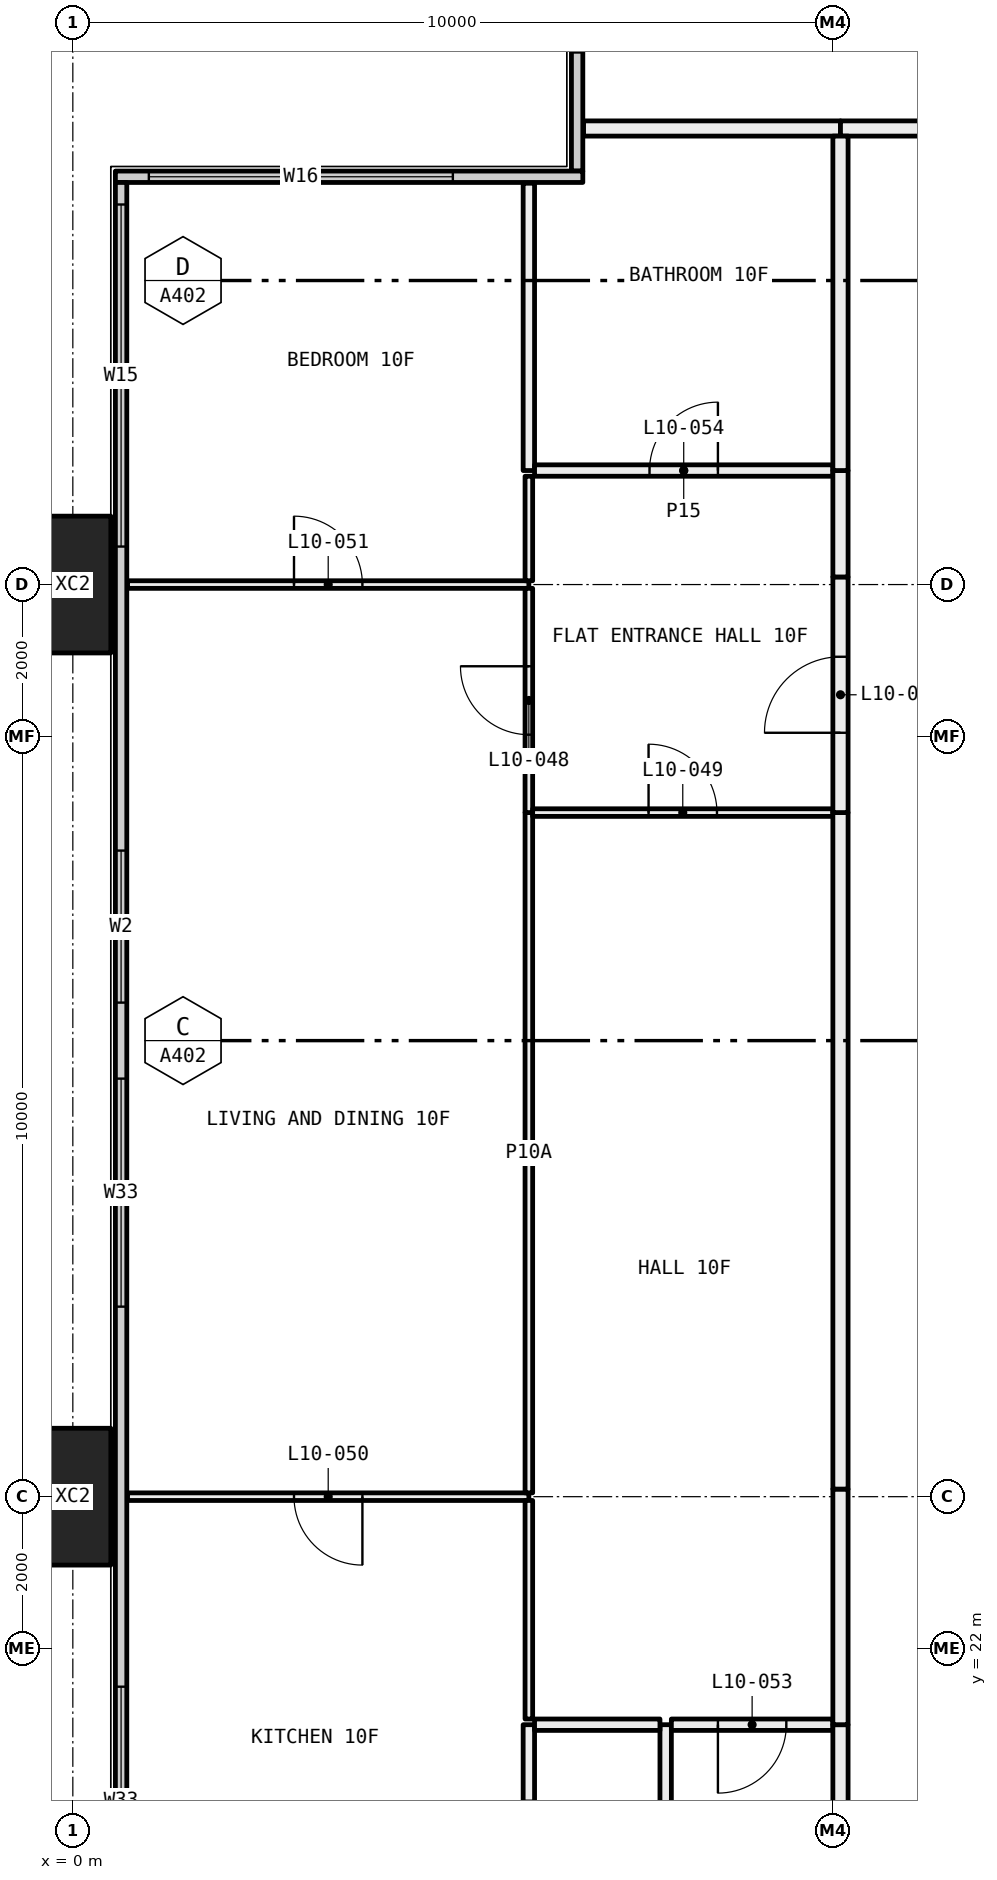
"""IFC4 building model, lengths in metres.
Left out: names, types, materials, properties, quantities, classifications, styles, units other than length and angle.
Written with IfcOpenShell. Run it as: python <this file> out.ifc"""

import sys

from ifc_helpers import new_model, si_unit, direction, frame, frame_2d, origin, origin_2d, place, context, subcontext, project, spatial, rectangle, hollow_rectangle, extrude, element, fill, save


model = new_model("IFC4")
c1 = context("Model", 3, precision=1e-05, world=origin(), true_north=direction((0.0, 1.0)))
c2 = subcontext(c1, "Body", "Model", "MODEL_VIEW")
j1 = project(units=[si_unit("LENGTHUNIT", "METRE"), si_unit("PLANEANGLEUNIT", "RADIAN")], contexts=[c1])
p1 = place(None, origin())
s1 = spatial("IfcSite", under=j1, at=p1, CompositionType="ELEMENT")
p2 = place(p1, origin())
s2 = spatial("IfcBuilding", under=s1, at=p2, CompositionType="ELEMENT")
p3 = place(p2, frame((0.0, 0.0, 47.25)))
s3 = spatial("IfcBuildingStorey", under=s2, at=p3, CompositionType="ELEMENT", Elevation=47.25)
for number, where, z_axis, x_axis in (
    (1, (0.0, 24.0, -0.4), (0.0, 0.0, 1.0), (0.0, 1.0, 0.0)),
    (2, (0.0, 36.0, -0.4), (0.0, 0.0, 1.0), (0.0, 1.0, 0.0)),
):
    element("IfcColumn", number, at=place(p3, frame(where, z_axis=z_axis, x_axis=x_axis)), inside=s3, PredefinedType="COLUMN", context=c2, shape_type="SweptSolid", body=[
        extrude(hollow_rectangle(XDim=1.8, YDim=1.0, WallThickness=0.07, at=origin_2d()), origin(), (0.0, 0.0, 1.0), 3.45),
    ])
p4 = place(p3, frame((6.635, 41.44, 0.0), z_axis=(0.0, 0.0, 1.0), x_axis=(0.0, 1.0, 0.0)))
e3 = element("IfcWall", 3, at=p4, inside=s3, PredefinedType="ELEMENTEDWALL", context=c2, shape_type="SweptSolid", body=[
    extrude(rectangle(XDim=5.85, YDim=0.15, at=frame_2d((2.925, 0.0))), origin(), (0.0, 0.0, 1.0), 3.05),
])
p5 = place(p4, frame((1.56, 0.0, 0.45)))
e4 = element("IfcOpeningElement", 4, at=p5, cuts=e3, PredefinedType="OPENING", context=c2, shape_type="SweptSolid", body=[
    extrude(rectangle(XDim=4.0, YDim=2.55, at=frame_2d((2.0, 1.275))), frame((0.0, 0.085, 0.0), z_axis=(0.0, -1.0, 0.0), x_axis=(1.0, 0.0, 0.0)), (0.0, 0.0, 1.0), 0.17),
])
p6 = place(p3, frame((0.56, 41.365, 0.0), z_axis=(0.0, 0.0, 1.0), x_axis=(1.0, 0.0, 0.0)))
e5 = element("IfcWall", 5, at=p6, inside=s3, PredefinedType="ELEMENTEDWALL", context=c2, shape_type="SweptSolid", body=[
    extrude(rectangle(XDim=6.15, YDim=0.15, at=frame_2d((3.075, 0.0))), origin(), (0.0, 0.0, 1.0), 3.05),
])
p7 = place(p6, frame((0.44, 0.0, 0.45)))
e6 = element("IfcOpeningElement", 6, at=p7, cuts=e5, PredefinedType="OPENING", context=c2, shape_type="SweptSolid", body=[
    extrude(rectangle(XDim=4.0, YDim=2.55, at=frame_2d((2.0, 1.275))), frame((0.0, 0.085, 0.0), z_axis=(0.0, -1.0, 0.0), x_axis=(1.0, 0.0, 0.0)), (0.0, 0.0, 1.0), 0.17),
])
p8 = place(p3, frame((0.635, 6.71, 0.0), z_axis=(0.0, 0.0, 1.0), x_axis=(0.0, 1.0, 0.0)))
e7 = element("IfcWall", 7, at=p8, inside=s3, PredefinedType="ELEMENTEDWALL", context=c2, shape_type="SweptSolid", body=[
    extrude(rectangle(XDim=34.58, YDim=0.15, at=frame_2d((17.29, 0.0))), origin(), (0.0, 0.0, 1.0), 3.05),
])
p9 = place(p8, frame((0.29, 0.0, 0.45)))
e8 = element("IfcOpeningElement", 8, at=p9, cuts=e7, PredefinedType="OPENING", context=c2, shape_type="SweptSolid", body=[
    extrude(rectangle(XDim=4.5, YDim=2.55, at=frame_2d((2.25, 1.275))), frame((0.0, 0.085, 0.0), z_axis=(0.0, -1.0, 0.0), x_axis=(1.0, 0.0, 0.0)), (0.0, 0.0, 1.0), 0.17),
])
p10 = place(p8, frame((7.79, 0.0, 0.45)))
e9 = element("IfcOpeningElement", 9, at=p10, cuts=e7, PredefinedType="OPENING", context=c2, shape_type="SweptSolid", body=[
    extrude(rectangle(XDim=3.0, YDim=2.55, at=frame_2d((1.5, 1.275))), frame((0.0, 0.085, 0.0), z_axis=(0.0, -1.0, 0.0), x_axis=(1.0, 0.0, 0.0)), (0.0, 0.0, 1.0), 0.17),
])
p11 = place(p8, frame((11.79, 0.0, 0.45)))
e10 = element("IfcOpeningElement", 10, at=p11, cuts=e7, PredefinedType="OPENING", context=c2, shape_type="SweptSolid", body=[
    extrude(rectangle(XDim=3.0, YDim=2.55, at=frame_2d((1.5, 1.275))), frame((0.0, 0.085, 0.0), z_axis=(0.0, -1.0, 0.0), x_axis=(1.0, 0.0, 0.0)), (0.0, 0.0, 1.0), 0.17),
])
p12 = place(p8, frame((19.79, 0.0, 0.45)))
e11 = element("IfcOpeningElement", 11, at=p12, cuts=e7, PredefinedType="OPENING", context=c2, shape_type="SweptSolid", body=[
    extrude(rectangle(XDim=3.0, YDim=2.55, at=frame_2d((1.5, 1.275))), frame((0.0, 0.085, 0.0), z_axis=(0.0, -1.0, 0.0), x_axis=(1.0, 0.0, 0.0)), (0.0, 0.0, 1.0), 0.17),
])
p13 = place(p8, frame((23.79, 0.0, 0.45)))
e12 = element("IfcOpeningElement", 12, at=p13, cuts=e7, PredefinedType="OPENING", context=c2, shape_type="SweptSolid", body=[
    extrude(rectangle(XDim=2.0, YDim=2.55, at=frame_2d((1.0, 1.275))), frame((0.0, 0.085, 0.0), z_axis=(0.0, -1.0, 0.0), x_axis=(1.0, 0.0, 0.0)), (0.0, 0.0, 1.0), 0.17),
])
p14 = place(p8, frame((29.79, 0.0, 0.45)))
e13 = element("IfcOpeningElement", 13, at=p14, cuts=e7, PredefinedType="OPENING", context=c2, shape_type="SweptSolid", body=[
    extrude(rectangle(XDim=4.5, YDim=2.55, at=frame_2d((2.25, 1.275))), frame((0.0, 0.085, 0.0), z_axis=(0.0, -1.0, 0.0), x_axis=(1.0, 0.0, 0.0)), (0.0, 0.0, 1.0), 0.17),
])
p15 = place(p3, frame((6.72, 42.0, 0.0), z_axis=(0.0, 0.0, 1.0), x_axis=(1.0, 0.0, 0.0)))
e14 = element("IfcWall", 14, at=p15, inside=s3, PredefinedType="PARTITIONING", context=c2, shape_type="SweptSolid", body=[
    extrude(rectangle(XDim=3.38, YDim=0.2, at=frame_2d((1.69, 0.0))), origin(), (0.0, 0.0, 1.0), 3.05),
])
p16 = place(p3, frame((10.1, 42.0, 0.0), z_axis=(0.0, 0.0, 1.0), x_axis=(1.0, 0.0, 0.0)))
e15 = element("IfcWall", 15, at=p16, inside=s3, PredefinedType="PARTITIONING", context=c2, shape_type="SweptSolid", body=[
    extrude(rectangle(XDim=1.9, YDim=0.2, at=frame_2d((0.95, 0.0))), origin(), (0.0, 0.0, 1.0), 3.05),
])
p17 = place(p3, frame((6.0, 24.0, 0.0), z_axis=(0.0, 0.0, 1.0), x_axis=(-1.0, 0.0, 0.0)))
e16 = element("IfcWall", 16, at=p17, inside=s3, PredefinedType="PARTITIONING", context=c2, shape_type="SweptSolid", body=[
    extrude(rectangle(XDim=5.28, YDim=0.1, at=frame_2d((2.64, 0.0))), origin(), (0.0, 0.0, 1.0), 2.45),
])
p18 = place(p17, frame((2.19, 0.0, 0.0)))
e17 = element("IfcOpeningElement", 17, at=p18, cuts=e16, PredefinedType="OPENING", context=c2, shape_type="SweptSolid", body=[
    extrude(rectangle(XDim=0.9, YDim=2.1, at=frame_2d((0.45, 1.05))), frame((0.0, 0.06, 0.0), z_axis=(0.0, -1.0, 0.0), x_axis=(1.0, 0.0, 0.0)), (0.0, 0.0, 1.0), 0.12),
])
p19 = place(p3, frame((6.0, 18.1, 0.0), z_axis=(0.0, 0.0, 1.0), x_axis=(0.0, 1.0, 0.0)))
e18 = element("IfcWall", 18, at=p19, inside=s3, PredefinedType="PARTITIONING", context=c2, shape_type="SweptSolid", body=[
    extrude(rectangle(XDim=2.9, YDim=0.15, at=frame_2d((1.45, 0.0))), origin(), (0.0, 0.0, 1.0), 3.05),
])
p20 = place(p19, frame((1.0, 0.0, 0.0)))
e19 = element("IfcOpeningElement", 19, at=p20, cuts=e18, PredefinedType="OPENING", context=c2, shape_type="SweptSolid", body=[
    extrude(rectangle(XDim=0.9, YDim=2.1, at=frame_2d((0.45, 1.05))), frame((0.0, 0.085, 0.0), z_axis=(0.0, -1.0, 0.0), x_axis=(1.0, 0.0, 0.0)), (0.0, 0.0, 1.0), 0.17),
])
p21 = place(p3, frame((6.0, 21.075, 0.0), z_axis=(0.0, 0.0, 1.0), x_axis=(0.0, 1.0, 0.0)))
e20 = element("IfcWall", 20, at=p21, inside=s3, PredefinedType="PARTITIONING", context=c2, shape_type="SweptSolid", body=[
    extrude(rectangle(XDim=2.875, YDim=0.1, at=frame_2d((1.438, 0.0))), origin(), (0.0, 0.0, 1.0), 2.45),
])
p22 = place(p3, frame((6.0, 36.0, 0.0), z_axis=(0.0, 0.0, 1.0), x_axis=(-1.0, 0.0, 0.0)))
e21 = element("IfcWall", 21, at=p22, inside=s3, PredefinedType="PARTITIONING", context=c2, shape_type="SweptSolid", body=[
    extrude(rectangle(XDim=5.28, YDim=0.1, at=frame_2d((2.64, 0.0))), origin(), (0.0, 0.0, 1.0), 2.45),
])
p23 = place(p22, frame((2.19, 0.0, 0.0)))
e22 = element("IfcOpeningElement", 22, at=p23, cuts=e21, PredefinedType="OPENING", context=c2, shape_type="SweptSolid", body=[
    extrude(rectangle(XDim=0.9, YDim=2.1, at=frame_2d((0.45, 1.05))), frame((0.0, 0.06, 0.0), z_axis=(0.0, -1.0, 0.0), x_axis=(1.0, 0.0, 0.0)), (0.0, 0.0, 1.0), 0.12),
])
p24 = place(p3, frame((6.0, 24.05, 0.0), z_axis=(0.0, 0.0, 1.0), x_axis=(0.0, 1.0, 0.0)))
e23 = element("IfcWall", 23, at=p24, inside=s3, PredefinedType="PARTITIONING", context=c2, shape_type="SweptSolid", body=[
    extrude(rectangle(XDim=8.95, YDim=0.1, at=frame_2d((4.475, 0.0))), origin(), (0.0, 0.0, 1.0), 2.45),
])
p25 = place(p3, frame((6.0, 33.0, 0.0), z_axis=(0.0, 0.0, 1.0), x_axis=(0.0, 1.0, 0.0)))
e24 = element("IfcWall", 24, at=p25, inside=s3, PredefinedType="PARTITIONING", context=c2, shape_type="SweptSolid", body=[
    extrude(rectangle(XDim=2.95, YDim=0.1, at=frame_2d((1.475, 0.0))), origin(), (0.0, 0.0, 1.0), 2.45),
])
p26 = place(p25, frame((1.025, 0.0, 0.0)))
e25 = element("IfcOpeningElement", 25, at=p26, cuts=e24, PredefinedType="OPENING", context=c2, shape_type="SweptSolid", body=[
    extrude(rectangle(XDim=0.9, YDim=2.1, at=frame_2d((0.45, 1.05))), frame((0.0, 0.06, 0.0), z_axis=(0.0, -1.0, 0.0), x_axis=(1.0, 0.0, 0.0)), (0.0, 0.0, 1.0), 0.12),
])
p27 = place(p3, frame((6.0, 36.05, 0.0), z_axis=(0.0, 0.0, 1.0), x_axis=(0.0, 1.0, 0.0)))
e26 = element("IfcWall", 26, at=p27, inside=s3, PredefinedType="PARTITIONING", context=c2, shape_type="SweptSolid", body=[
    extrude(rectangle(XDim=1.375, YDim=0.1, at=frame_2d((0.688, 0.0))), origin(), (0.0, 0.0, 1.0), 2.45),
])
p28 = place(p3, frame((6.0, 37.5, 0.0), z_axis=(0.0, 0.0, 1.0), x_axis=(0.0, 1.0, 0.0)))
e27 = element("IfcWall", 27, at=p28, inside=s3, PredefinedType="PARTITIONING", context=c2, shape_type="SweptSolid", body=[
    extrude(rectangle(XDim=3.78, YDim=0.15, at=frame_2d((1.89, 0.0))), origin(), (0.0, 0.0, 1.0), 3.05),
])
p29 = place(p3, frame((7.8, 18.1, 0.0), z_axis=(0.0, 0.0, 1.0), x_axis=(0.0, 1.0, 0.0)))
e28 = element("IfcWall", 28, at=p29, inside=s3, PredefinedType="PARTITIONING", context=c2, shape_type="SweptSolid", body=[
    extrude(rectangle(XDim=2.9, YDim=0.15, at=frame_2d((1.45, 0.0))), origin(), (0.0, 0.0, 1.0), 3.05),
])
p30 = place(p3, frame((7.725, 21.0, 0.0), z_axis=(0.0, 0.0, 1.0), x_axis=(-1.0, 0.0, 0.0)))
e29 = element("IfcWall", 29, at=p30, inside=s3, PredefinedType="PARTITIONING", context=c2, shape_type="SweptSolid", body=[
    extrude(rectangle(XDim=1.65, YDim=0.15, at=frame_2d((0.825, 0.0))), origin(), (0.0, 0.0, 1.0), 3.05),
])
p31 = place(p3, frame((10.0, 21.0, 0.0), z_axis=(0.0, 0.0, 1.0), x_axis=(-1.0, 0.0, 0.0)))
e30 = element("IfcWall", 30, at=p31, inside=s3, PredefinedType="PARTITIONING", context=c2, shape_type="SweptSolid", body=[
    extrude(rectangle(XDim=2.125, YDim=0.15, at=frame_2d((1.062, 0.0))), origin(), (0.0, 0.0, 1.0), 3.05),
])
p32 = place(p31, frame((0.613, 0.0, 0.0)))
e31 = element("IfcOpeningElement", 31, at=p32, cuts=e30, PredefinedType="OPENING", context=c2, shape_type="SweptSolid", body=[
    extrude(rectangle(XDim=0.9, YDim=2.1, at=frame_2d((0.45, 1.05))), frame((0.0, 0.085, 0.0), z_axis=(0.0, -1.0, 0.0), x_axis=(1.0, 0.0, 0.0)), (0.0, 0.0, 1.0), 0.17),
])
p33 = place(p3, frame((10.1, 18.1, 0.0), z_axis=(0.0, 0.0, 1.0), x_axis=(0.0, 1.0, 0.0)))
e32 = element("IfcWall", 32, at=p33, inside=s3, PredefinedType="PARTITIONING", context=c2, shape_type="SweptSolid", body=[
    extrude(rectangle(XDim=2.9, YDim=0.2, at=frame_2d((1.45, 0.0))), origin(), (0.0, 0.0, 1.0), 3.05),
])
p34 = place(p3, frame((10.0, 33.0, 0.0), z_axis=(0.0, 0.0, 1.0), x_axis=(-1.0, 0.0, 0.0)))
e33 = element("IfcWall", 33, at=p34, inside=s3, PredefinedType="PARTITIONING", context=c2, shape_type="SweptSolid", body=[
    extrude(rectangle(XDim=3.95, YDim=0.1, at=frame_2d((1.975, 0.0))), origin(), (0.0, 0.0, 1.0), 3.05),
])
p35 = place(p34, frame((1.525, 0.0, 0.0)))
e34 = element("IfcOpeningElement", 34, at=p35, cuts=e33, PredefinedType="OPENING", context=c2, shape_type="SweptSolid", body=[
    extrude(rectangle(XDim=0.9, YDim=2.1, at=frame_2d((0.45, 1.05))), frame((0.0, 0.06, 0.0), z_axis=(0.0, -1.0, 0.0), x_axis=(1.0, 0.0, 0.0)), (0.0, 0.0, 1.0), 0.12),
])
p36 = place(p3, frame((10.1, 21.0, 0.0), z_axis=(0.0, 0.0, 1.0), x_axis=(0.0, 1.0, 0.0)))
e35 = element("IfcWall", 35, at=p36, inside=s3, PredefinedType="PARTITIONING", context=c2, shape_type="SweptSolid", body=[
    extrude(rectangle(XDim=3.1, YDim=0.2, at=frame_2d((1.55, 0.0))), origin(), (0.0, 0.0, 1.0), 2.45),
])
p37 = place(p3, frame((10.1, 24.1, 0.0), z_axis=(0.0, 0.0, 1.0), x_axis=(0.0, 1.0, 0.0)))
e36 = element("IfcWall", 36, at=p37, inside=s3, PredefinedType="PARTITIONING", context=c2, shape_type="SweptSolid", body=[
    extrude(rectangle(XDim=8.9, YDim=0.2, at=frame_2d((4.45, 0.0))), origin(), (0.0, 0.0, 1.0), 3.05),
])
p38 = place(p3, frame((10.0, 37.5, 0.0), z_axis=(0.0, 0.0, 1.0), x_axis=(-1.0, 0.0, 0.0)))
e37 = element("IfcWall", 37, at=p38, inside=s3, PredefinedType="PARTITIONING", context=c2, shape_type="SweptSolid", body=[
    extrude(rectangle(XDim=3.925, YDim=0.15, at=frame_2d((1.962, 0.0))), origin(), (0.0, 0.0, 1.0), 3.05),
])
p39 = place(p38, frame((1.512, 0.0, 0.0)))
e38 = element("IfcOpeningElement", 38, at=p39, cuts=e37, PredefinedType="OPENING", context=c2, shape_type="SweptSolid", body=[
    extrude(rectangle(XDim=0.9, YDim=2.1, at=frame_2d((0.45, 1.05))), frame((0.0, 0.085, 0.0), z_axis=(0.0, -1.0, 0.0), x_axis=(1.0, 0.0, 0.0)), (0.0, 0.0, 1.0), 0.17),
])
p40 = place(p3, frame((10.1, 33.0, 0.0), z_axis=(0.0, 0.0, 1.0), x_axis=(0.0, 1.0, 0.0)))
e39 = element("IfcWall", 39, at=p40, inside=s3, PredefinedType="PARTITIONING", context=c2, shape_type="SweptSolid", body=[
    extrude(rectangle(XDim=3.1, YDim=0.2, at=frame_2d((1.55, 0.0))), origin(), (0.0, 0.0, 1.0), 2.45),
])
p41 = place(p40, frame((1.05, 0.0, 0.0)))
e40 = element("IfcOpeningElement", 40, at=p41, cuts=e39, PredefinedType="OPENING", context=c2, shape_type="SweptSolid", body=[
    extrude(rectangle(XDim=1.0, YDim=2.1, at=frame_2d((0.5, 1.05))), frame((0.0, 0.11, 0.0), z_axis=(0.0, -1.0, 0.0), x_axis=(1.0, 0.0, 0.0)), (0.0, 0.0, 1.0), 0.22),
])
p42 = place(p3, frame((10.1, 36.1, 0.0), z_axis=(0.0, 0.0, 1.0), x_axis=(0.0, 1.0, 0.0)))
e41 = element("IfcWall", 41, at=p42, inside=s3, PredefinedType="PARTITIONING", context=c2, shape_type="SweptSolid", body=[
    extrude(rectangle(XDim=1.4, YDim=0.2, at=frame_2d((0.7, 0.0))), origin(), (0.0, 0.0, 1.0), 3.05),
])
p43 = place(p3, frame((10.1, 37.5, 0.0), z_axis=(0.0, 0.0, 1.0), x_axis=(0.0, 1.0, 0.0)))
e42 = element("IfcWall", 42, at=p43, inside=s3, PredefinedType="PARTITIONING", context=c2, shape_type="SweptSolid", body=[
    extrude(rectangle(XDim=4.4, YDim=0.2, at=frame_2d((2.2, 0.0))), origin(), (0.0, 0.0, 1.0), 3.05),
])
p44 = place(p7, origin())
e43 = element("IfcWindow", 43, at=p44, inside=s3, PartitioningType="SINGLE_PANEL", PredefinedType="WINDOW", context=c2, shape_type="SweptSolid", body=[
    extrude(rectangle(XDim=4.0, YDim=2.55, at=frame_2d((2.0, 1.275))), frame((0.0, 0.03, 0.0), z_axis=(0.0, -1.0, 0.0), x_axis=(1.0, 0.0, 0.0)), (0.0, 0.0, 1.0), 0.06),
])
fill(e6, e43)
p45 = place(p11, origin())
e44 = element("IfcWindow", 44, at=p45, inside=s3, PartitioningType="SINGLE_PANEL", PredefinedType="WINDOW", context=c2, shape_type="SweptSolid", body=[
    extrude(rectangle(XDim=3.0, YDim=2.55, at=frame_2d((1.5, 1.275))), frame((0.0, 0.03, 0.0), z_axis=(0.0, -1.0, 0.0), x_axis=(1.0, 0.0, 0.0)), (0.0, 0.0, 1.0), 0.06),
])
fill(e10, e44)
p46 = place(p12, origin())
e45 = element("IfcWindow", 45, at=p46, inside=s3, PartitioningType="SINGLE_PANEL", PredefinedType="WINDOW", context=c2, shape_type="SweptSolid", body=[
    extrude(rectangle(XDim=3.0, YDim=2.55, at=frame_2d((1.5, 1.275))), frame((0.0, 0.03, 0.0), z_axis=(0.0, -1.0, 0.0), x_axis=(1.0, 0.0, 0.0)), (0.0, 0.0, 1.0), 0.06),
])
fill(e11, e45)
p47 = place(p13, origin())
e46 = element("IfcWindow", 46, at=p47, inside=s3, PartitioningType="SINGLE_PANEL", PredefinedType="WINDOW", context=c2, shape_type="SweptSolid", body=[
    extrude(rectangle(XDim=2.0, YDim=2.55, at=frame_2d((1.0, 1.275))), frame((0.0, 0.03, 0.0), z_axis=(0.0, -1.0, 0.0), x_axis=(1.0, 0.0, 0.0)), (0.0, 0.0, 1.0), 0.06),
])
fill(e12, e46)
p48 = place(p14, origin())
e47 = element("IfcWindow", 47, at=p48, inside=s3, PartitioningType="SINGLE_PANEL", PredefinedType="WINDOW", context=c2, shape_type="SweptSolid", body=[
    extrude(rectangle(XDim=4.5, YDim=2.55, at=frame_2d((2.25, 1.275))), frame((0.0, 0.03, 0.0), z_axis=(0.0, -1.0, 0.0), x_axis=(1.0, 0.0, 0.0)), (0.0, 0.0, 1.0), 0.06),
])
fill(e13, e47)
p49 = place(p41, origin())
e48 = element("IfcDoor", 48, at=p49, inside=s3, OperationType="SINGLE_SWING_RIGHT", PredefinedType="DOOR", context=c2, shape_type="SweptSolid", body=[
    extrude(rectangle(XDim=1.0, YDim=2.1, at=frame_2d((0.5, 1.05))), frame((0.0, 0.025, 0.0), z_axis=(0.0, -1.0, 0.0), x_axis=(1.0, 0.0, 0.0)), (0.0, 0.0, 1.0), 0.05),
])
fill(e40, e48)
p50 = place(p26, origin())
e49 = element("IfcDoor", 49, at=p50, inside=s3, OperationType="SINGLE_SWING_LEFT", PredefinedType="DOOR", context=c2, shape_type="SweptSolid", body=[
    extrude(rectangle(XDim=0.9, YDim=2.1, at=frame_2d((0.45, 1.05))), frame((0.0, 0.025, 0.0), z_axis=(0.0, -1.0, 0.0), x_axis=(1.0, 0.0, 0.0)), (0.0, 0.0, 1.0), 0.05),
])
fill(e25, e49)
p51 = place(p35, frame((0.9, 0.0, 0.0), x_axis=(-1.0, 0.0, 0.0)))
e50 = element("IfcDoor", 50, at=p51, inside=s3, OperationType="SINGLE_SWING_RIGHT", PredefinedType="DOOR", context=c2, shape_type="SweptSolid", body=[
    extrude(rectangle(XDim=0.9, YDim=2.1, at=frame_2d((0.45, 1.05))), frame((0.0, 0.025, 0.0), z_axis=(0.0, -1.0, 0.0), x_axis=(1.0, 0.0, 0.0)), (0.0, 0.0, 1.0), 0.05),
])
fill(e34, e50)
p52 = place(p18, origin())
e51 = element("IfcDoor", 51, at=p52, inside=s3, OperationType="SINGLE_SWING_RIGHT", PredefinedType="DOOR", context=c2, shape_type="SweptSolid", body=[
    extrude(rectangle(XDim=0.9, YDim=2.1, at=frame_2d((0.45, 1.05))), frame((0.0, 0.025, 0.0), z_axis=(0.0, -1.0, 0.0), x_axis=(1.0, 0.0, 0.0)), (0.0, 0.0, 1.0), 0.05),
])
fill(e17, e51)
p53 = place(p23, frame((0.9, 0.0, 0.0), x_axis=(-1.0, 0.0, 0.0)))
e52 = element("IfcDoor", 52, at=p53, inside=s3, OperationType="SINGLE_SWING_RIGHT", PredefinedType="DOOR", context=c2, shape_type="SweptSolid", body=[
    extrude(rectangle(XDim=0.9, YDim=2.1, at=frame_2d((0.45, 1.05))), frame((0.0, 0.025, 0.0), z_axis=(0.0, -1.0, 0.0), x_axis=(1.0, 0.0, 0.0)), (0.0, 0.0, 1.0), 0.05),
])
fill(e22, e52)
p54 = place(p32, origin())
e53 = element("IfcDoor", 53, at=p54, inside=s3, OperationType="SINGLE_SWING_LEFT", PredefinedType="DOOR", context=c2, shape_type="SweptSolid", body=[
    extrude(rectangle(XDim=0.9, YDim=2.1, at=frame_2d((0.45, 1.05))), frame((0.0, 0.025, 0.0), z_axis=(0.0, -1.0, 0.0), x_axis=(1.0, 0.0, 0.0)), (0.0, 0.0, 1.0), 0.05),
])
fill(e31, e53)
p55 = place(p39, frame((0.9, 0.0, 0.0), x_axis=(-1.0, 0.0, 0.0)))
e54 = element("IfcDoor", 54, at=p55, inside=s3, OperationType="SINGLE_SWING_LEFT", PredefinedType="DOOR", context=c2, shape_type="SweptSolid", body=[
    extrude(rectangle(XDim=0.9, YDim=2.1, at=frame_2d((0.45, 1.05))), frame((0.0, 0.025, 0.0), z_axis=(0.0, -1.0, 0.0), x_axis=(1.0, 0.0, 0.0)), (0.0, 0.0, 1.0), 0.05),
])
fill(e38, e54)
save(model, sys.argv[1])
